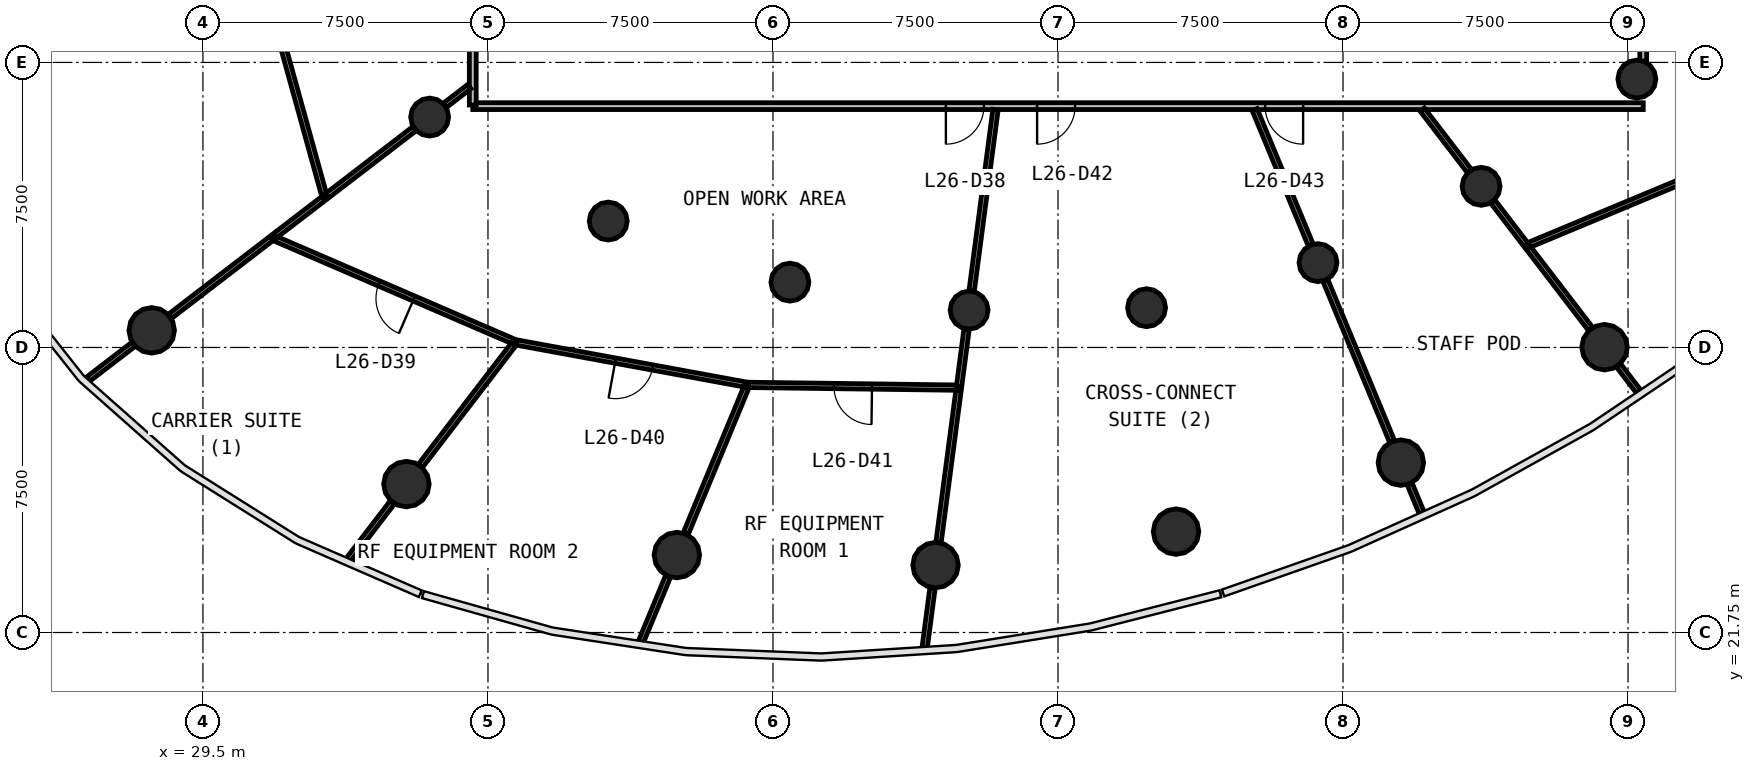
"""IFC4 building model, lengths in metres.
Left out: names, types, materials, properties, quantities, classifications, styles, units other than length and angle.
Written with IfcOpenShell. Run it as: python <this file> out.ifc"""

import sys

from ifc_helpers import new_model, si_unit, direction, frame, frame_2d, origin, origin_2d, place, context, subcontext, project, spatial, rectangle, circle, extrude, source, transform, mapped, element, fill, save


model = new_model("IFC4")
c1 = context("Model", 3, precision=1e-05, world=origin(), true_north=direction((0.0, 1.0)))
c2 = subcontext(c1, "Body", "Model", "MODEL_VIEW")
j1 = project(units=[si_unit("LENGTHUNIT", "METRE"), si_unit("PLANEANGLEUNIT", "RADIAN")], contexts=[c1])
p1 = place(None, origin())
s1 = spatial("IfcSite", under=j1, at=p1, CompositionType="ELEMENT")
p2 = place(p1, origin())
s2 = spatial("IfcBuilding", under=s1, at=p2, CompositionType="ELEMENT")
p3 = place(p2, frame((0.0, 0.0, 112.6)))
s3 = spatial("IfcBuildingStorey", under=s2, at=p3, CompositionType="ELEMENT", Elevation=112.6)
m1 = source(origin(), c2, "Body", "SweptSolid", [
    extrude(circle(Radius=0.6, at=origin_2d()), origin(), (0.0, 0.0, 1.0), 4.1),
])
for number, where, z_axis, x_axis in (
    (1, (28.152, 29.701, 0.0), (0.0, 0.0, 1.0), (1.0, 0.0, 0.0)),
    (2, (34.854, 25.655, 0.0), (0.0, 0.0, 1.0), (1.0, 0.0, 0.0)),
    (3, (41.971, 23.788, 0.0), (0.0, 0.0, 1.0), (1.0, 0.0, 0.0)),
    (4, (48.778, 23.523, 0.0), (0.0, 0.0, 1.0), (1.0, 0.0, 0.0)),
    (5, (55.106, 24.405, 0.0), (0.0, 0.0, 1.0), (1.0, 0.0, 0.0)),
    (6, (61.022, 26.219, 0.0), (0.0, 0.0, 1.0), (1.0, 0.0, 0.0)),
    (7, (66.382, 29.257, 0.0), (0.0, 0.0, 1.0), (1.0, 0.0, 0.0)),
):
    element("IfcColumn", number, at=place(p3, frame(where, z_axis=z_axis, x_axis=x_axis)), inside=s3, PredefinedType="COLUMN", context=c2, shape_type="MappedRepresentation", body=[
        mapped(m1, transform((0.0, 0.0, 0.0), scale=1.0)),
    ])
m2 = source(origin(), c2, "Body", "SweptSolid", [
    extrude(circle(Radius=0.5, at=origin_2d()), origin(), (0.0, 0.0, 1.0), 4.1),
])
for number, where, z_axis, x_axis in (
    (8, (35.465, 35.312, 0.0), (0.0, 0.0, 1.0), (1.0, 0.0, 0.0)),
    (9, (40.165, 32.576, 0.0), (0.0, 0.0, 1.0), (1.0, 0.0, 0.0)),
    (10, (44.945, 30.969, 0.0), (0.0, 0.0, 1.0), (1.0, 0.0, 0.0)),
    (11, (49.661, 30.233, 0.0), (0.0, 0.0, 1.0), (1.0, 0.0, 0.0)),
    (12, (54.331, 30.297, 0.0), (0.0, 0.0, 1.0), (1.0, 0.0, 0.0)),
    (13, (58.842, 31.482, 0.0), (0.0, 0.0, 1.0), (1.0, 0.0, 0.0)),
    (14, (63.134, 33.49, 0.0), (0.0, 0.0, 1.0), (1.0, 0.0, 0.0)),
    (15, (67.232, 36.312, 0.0), (0.0, 0.0, 1.0), (1.0, 0.0, 0.0)),
):
    element("IfcColumn", number, at=place(p3, frame(where, z_axis=z_axis, x_axis=x_axis)), inside=s3, PredefinedType="COLUMN", context=c2, shape_type="MappedRepresentation", body=[
        mapped(m2, transform((0.0, 0.0, 0.0), scale=1.0)),
    ])
p4 = place(p3, frame((67.4, 35.6, 0.0), z_axis=(0.0, 0.0, 1.0), x_axis=(-1.0, 0.0, 0.0)))
e16 = element("IfcWall", 16, at=p4, inside=s3, PredefinedType="PARTITIONING", context=c2, shape_type="SweptSolid", body=[
    extrude(rectangle(XDim=30.8, YDim=0.18, at=frame_2d((15.4, 0.0))), origin(), (0.0, 0.0, 1.0), 2.9),
])
p5 = place(p4, frame((17.35, 0.0, 0.0)))
e17 = element("IfcOpeningElement", 17, at=p5, cuts=e16, PredefinedType="OPENING", context=c2, shape_type="SweptSolid", body=[
    extrude(rectangle(XDim=1.0, YDim=2.1, at=frame_2d((0.5, 1.05))), frame((0.0, 0.1, 0.0), z_axis=(0.0, -1.0, 0.0), x_axis=(1.0, 0.0, 0.0)), (0.0, 0.0, 1.0), 0.2),
])
p6 = place(p4, frame((14.95, 0.0, 0.0)))
e18 = element("IfcOpeningElement", 18, at=p6, cuts=e16, PredefinedType="OPENING", context=c2, shape_type="SweptSolid", body=[
    extrude(rectangle(XDim=1.0, YDim=2.1, at=frame_2d((0.5, 1.05))), frame((0.0, 0.1, 0.0), z_axis=(0.0, -1.0, 0.0), x_axis=(1.0, 0.0, 0.0)), (0.0, 0.0, 1.0), 0.2),
])
p7 = place(p4, frame((8.95, 0.0, 0.0)))
e19 = element("IfcOpeningElement", 19, at=p7, cuts=e16, PredefinedType="OPENING", context=c2, shape_type="SweptSolid", body=[
    extrude(rectangle(XDim=1.0, YDim=2.1, at=frame_2d((0.5, 1.05))), frame((0.0, 0.1, 0.0), z_axis=(0.0, -1.0, 0.0), x_axis=(1.0, 0.0, 0.0)), (0.0, 0.0, 1.0), 0.2),
])
p8 = place(p3, frame((67.4, 60.37, 0.0), z_axis=(0.0, 0.0, 1.0), x_axis=(0.0, -1.0, 0.0)))
e20 = element("IfcWall", 20, at=p8, inside=s3, PredefinedType="PARTITIONING", context=c2, shape_type="SweptSolid", body=[
    extrude(rectangle(XDim=23.583, YDim=0.18, at=frame_2d((11.791, 0.0))), origin(), (0.0, 0.0, 1.0), 2.9),
])
p9 = place(p8, frame((9.232, 0.0, 0.0)))
e21 = element("IfcOpeningElement", 21, at=p9, cuts=e20, PredefinedType="OPENING", context=c2, shape_type="SweptSolid", body=[
    extrude(rectangle(XDim=0.9, YDim=2.1, at=frame_2d((0.45, 1.05))), frame((0.0, 0.1, 0.0), z_axis=(0.0, -1.0, 0.0), x_axis=(1.0, 0.0, 0.0)), (0.0, 0.0, 1.0), 0.2),
])
p10 = place(p8, frame((6.232, 0.0, 0.0)))
e22 = element("IfcOpeningElement", 22, at=p10, cuts=e20, PredefinedType="OPENING", context=c2, shape_type="SweptSolid", body=[
    extrude(rectangle(XDim=0.9, YDim=2.1, at=frame_2d((0.45, 1.05))), frame((0.0, 0.1, 0.0), z_axis=(0.0, -1.0, 0.0), x_axis=(1.0, 0.0, 0.0)), (0.0, 0.0, 1.0), 0.2),
])
p11 = place(p8, frame((3.032, 0.0, 0.0)))
e23 = element("IfcOpeningElement", 23, at=p11, cuts=e20, PredefinedType="OPENING", context=c2, shape_type="SweptSolid", body=[
    extrude(rectangle(XDim=0.9, YDim=2.1, at=frame_2d((0.45, 1.05))), frame((0.0, 0.1, 0.0), z_axis=(0.0, -1.0, 0.0), x_axis=(1.0, 0.0, 0.0)), (0.0, 0.0, 1.0), 0.2),
])
p12 = place(p8, frame((11.333, 0.0, 0.0)))
e24 = element("IfcOpeningElement", 24, at=p12, cuts=e20, PredefinedType="OPENING", context=c2, shape_type="SweptSolid", body=[
    extrude(rectangle(XDim=1.0, YDim=2.1, at=frame_2d((0.5, 1.05))), frame((0.0, 0.1, 0.0), z_axis=(0.0, -1.0, 0.0), x_axis=(1.0, 0.0, 0.0)), (0.0, 0.0, 1.0), 0.2),
])
p13 = place(p3, frame((36.6, 35.63, 0.0), z_axis=(0.0, 0.0, 1.0), x_axis=(0.0, 1.0, 0.0)))
e25 = element("IfcWall", 25, at=p13, inside=s3, PredefinedType="PARTITIONING", context=c2, shape_type="SweptSolid", body=[
    extrude(rectangle(XDim=23.583, YDim=0.18, at=frame_2d((11.791, 0.0))), origin(), (0.0, 0.0, 1.0), 2.9),
])
p14 = place(p13, frame((19.133, 0.0, 0.0)))
e26 = element("IfcOpeningElement", 26, at=p14, cuts=e25, PredefinedType="OPENING", context=c2, shape_type="SweptSolid", body=[
    extrude(rectangle(XDim=1.0, YDim=2.1, at=frame_2d((0.5, 1.05))), frame((0.0, 0.1, 0.0), z_axis=(0.0, -1.0, 0.0), x_axis=(1.0, 0.0, 0.0)), (0.0, 0.0, 1.0), 0.2),
])
p15 = place(p13, frame((11.333, 0.0, 0.0)))
e27 = element("IfcOpeningElement", 27, at=p15, cuts=e25, PredefinedType="OPENING", context=c2, shape_type="SweptSolid", body=[
    extrude(rectangle(XDim=1.0, YDim=2.1, at=frame_2d((0.5, 1.05))), frame((0.0, 0.1, 0.0), z_axis=(0.0, -1.0, 0.0), x_axis=(1.0, 0.0, 0.0)), (0.0, 0.0, 1.0), 0.2),
])
p16 = place(p3, frame((37.718, 29.387, 0.0), z_axis=(0.0, 0.0, 1.0), x_axis=(-0.918146849398, 0.396240284349, 0.0)))
e28 = element("IfcWall", 28, at=p16, inside=s3, PredefinedType="PARTITIONING", context=c2, shape_type="SweptSolid", body=[
    extrude(rectangle(XDim=6.953, YDim=0.14, at=frame_2d((3.477, 0.0))), origin(), (0.0, 0.0, 1.0), 2.9),
])
p17 = place(p16, frame((2.903, 0.0, 0.0)))
e29 = element("IfcOpeningElement", 29, at=p17, cuts=e28, PredefinedType="OPENING", context=c2, shape_type="SweptSolid", body=[
    extrude(rectangle(XDim=1.0, YDim=2.1, at=frame_2d((0.5, 1.05))), frame((0.0, 0.08, 0.0), z_axis=(0.0, -1.0, 0.0), x_axis=(1.0, 0.0, 0.0)), (0.0, 0.0, 1.0), 0.16),
])
p18 = place(p3, frame((43.826, 28.265, 0.0), z_axis=(0.0, 0.0, 1.0), x_axis=(-0.983538283384, 0.180699875811, 0.0)))
e30 = element("IfcWall", 30, at=p18, inside=s3, PredefinedType="PARTITIONING", context=c2, shape_type="SweptSolid", body=[
    extrude(rectangle(XDim=6.18, YDim=0.14, at=frame_2d((3.09, 0.0))), origin(), (0.0, 0.0, 1.0), 2.9),
])
p19 = place(p18, frame((2.53, 0.0, 0.0)))
e31 = element("IfcOpeningElement", 31, at=p19, cuts=e30, PredefinedType="OPENING", context=c2, shape_type="SweptSolid", body=[
    extrude(rectangle(XDim=1.0, YDim=2.1, at=frame_2d((0.5, 1.05))), frame((0.0, 0.08, 0.0), z_axis=(0.0, -1.0, 0.0), x_axis=(1.0, 0.0, 0.0)), (0.0, 0.0, 1.0), 0.16),
])
p20 = place(p3, frame((64.336, 31.924, 0.0), z_axis=(0.0, 0.0, 1.0), x_axis=(0.922965808989, 0.384881950002, 0.0)))
e32 = element("IfcWall", 32, at=p20, inside=s3, PredefinedType="PARTITIONING", context=c2, shape_type="SweptSolid", body=[
    extrude(rectangle(XDim=6.048, YDim=0.14, at=frame_2d((3.024, 0.0))), origin(), (0.0, 0.0, 1.0), 2.9),
])
p21 = place(p3, frame((31.095, 39.022, 0.0), z_axis=(0.0, 0.0, 1.0), x_axis=(0.266539759446, -0.963823924083, 0.0)))
e33 = element("IfcWall", 33, at=p21, inside=s3, PredefinedType="PARTITIONING", context=c2, shape_type="SweptSolid", body=[
    extrude(rectangle(XDim=6.045, YDim=0.14, at=frame_2d((3.023, 0.0))), origin(), (0.0, 0.0, 1.0), 2.9),
])
p22 = place(p3, frame((49.392, 28.193, 0.0), z_axis=(0.0, 0.0, 1.0), x_axis=(-0.999914253275, 0.013095270007, 0.0)))
e34 = element("IfcWall", 34, at=p22, inside=s3, PredefinedType="PARTITIONING", context=c2, shape_type="SweptSolid", body=[
    extrude(rectangle(XDim=5.537, YDim=0.14, at=frame_2d((2.769, 0.0))), origin(), (0.0, 0.0, 1.0), 2.9),
])
p23 = place(p22, frame((2.287, 0.0, 0.0)))
e35 = element("IfcOpeningElement", 35, at=p23, cuts=e34, PredefinedType="OPENING", context=c2, shape_type="SweptSolid", body=[
    extrude(rectangle(XDim=1.0, YDim=2.1, at=frame_2d((0.5, 1.05))), frame((0.0, 0.08, 0.0), z_axis=(0.0, -1.0, 0.0), x_axis=(1.0, 0.0, 0.0)), (0.0, 0.0, 1.0), 0.16),
])
p24 = place(p3, frame((50.356, 35.51, 0.0), z_axis=(0.0, 0.0, 1.0), x_axis=(-0.130523979823, -0.991445152639, 0.0)))
e36 = element("IfcWall", 36, at=p24, inside=s3, PredefinedType="PARTITIONING", context=c2, shape_type="SweptSolid", body=[
    extrude(rectangle(XDim=4.818, YDim=0.14, at=frame_2d((2.409, 0.0))), origin(), (0.0, 0.0, 1.0), 2.9),
])
p25 = place(p3, frame((59.035, 31.016, 0.0), z_axis=(0.0, 0.0, 1.0), x_axis=(0.382705930348, -0.923870213221, 0.0)))
e37 = element("IfcWall", 37, at=p25, inside=s3, PredefinedType="PARTITIONING", context=c2, shape_type="SweptSolid", body=[
    extrude(rectangle(XDim=4.587, YDim=0.14, at=frame_2d((2.293, 0.0))), origin(), (0.0, 0.0, 1.0), 2.9),
])
p26 = place(p3, frame((43.798, 28.199, 0.0), z_axis=(0.0, 0.0, 1.0), x_axis=(-0.382718911932, -0.923864835595, 0.0)))
e38 = element("IfcWall", 38, at=p26, inside=s3, PredefinedType="PARTITIONING", context=c2, shape_type="SweptSolid", body=[
    extrude(rectangle(XDim=4.17, YDim=0.14, at=frame_2d((2.085, 0.0))), origin(), (0.0, 0.0, 1.0), 2.9),
])
p27 = place(p3, frame((49.383, 28.123, 0.0), z_axis=(0.0, 0.0, 1.0), x_axis=(-0.130510858064, -0.991446880033, 0.0)))
e39 = element("IfcWall", 39, at=p27, inside=s3, PredefinedType="PARTITIONING", context=c2, shape_type="SweptSolid", body=[
    extrude(rectangle(XDim=4.035, YDim=0.14, at=frame_2d((2.018, 0.0))), origin(), (0.0, 0.0, 1.0), 2.9),
])
p28 = place(p3, frame((37.674, 29.33, 0.0), z_axis=(0.0, 0.0, 1.0), x_axis=(-0.608749592837, -0.793362422365, 0.0)))
e40 = element("IfcWall", 40, at=p28, inside=s3, PredefinedType="PARTITIONING", context=c2, shape_type="SweptSolid", body=[
    extrude(rectangle(XDim=4.028, YDim=0.14, at=frame_2d((2.014, 0.0))), origin(), (0.0, 0.0, 1.0), 2.9),
])
p29 = place(p3, frame((57.174, 35.51, 0.0), z_axis=(0.0, 0.0, 1.0), x_axis=(0.382644558062, -0.923895633817, 0.0)))
e41 = element("IfcWall", 41, at=p29, inside=s3, PredefinedType="PARTITIONING", context=c2, shape_type="SweptSolid", body=[
    extrude(rectangle(XDim=3.854, YDim=0.14, at=frame_2d((1.927, 0.0))), origin(), (0.0, 0.0, 1.0), 2.9),
])
p30 = place(p3, frame((31.311, 32.125, 0.0), z_axis=(0.0, 0.0, 1.0), x_axis=(-0.793367783223, -0.608742606152, 0.0)))
e42 = element("IfcWall", 42, at=p30, inside=s3, PredefinedType="PARTITIONING", context=c2, shape_type="SweptSolid", body=[
    extrude(rectangle(XDim=3.377, YDim=0.14, at=frame_2d((1.688, 0.0))), origin(), (0.0, 0.0, 1.0), 2.9),
])
p31 = place(p3, frame((35.065, 35.005, 0.0), z_axis=(0.0, 0.0, 1.0), x_axis=(-0.793337721891, -0.608781782764, 0.0)))
e43 = element("IfcWall", 43, at=p31, inside=s3, PredefinedType="PARTITIONING", context=c2, shape_type="SweptSolid", body=[
    extrude(rectangle(XDim=2.897, YDim=0.14, at=frame_2d((1.448, 0.0))), origin(), (0.0, 0.0, 1.0), 2.9),
])
p32 = place(p3, frame((64.38, 31.866, 0.0), z_axis=(0.0, 0.0, 1.0), x_axis=(0.608796156599, -0.793326691666, 0.0)))
e44 = element("IfcWall", 44, at=p32, inside=s3, PredefinedType="PARTITIONING", context=c2, shape_type="SweptSolid", body=[
    extrude(rectangle(XDim=2.684, YDim=0.14, at=frame_2d((1.342, 0.0))), origin(), (0.0, 0.0, 1.0), 2.9),
])
p33 = place(p3, frame((61.584, 35.51, 0.0), z_axis=(0.0, 0.0, 1.0), x_axis=(0.608727763541, -0.793379171578, 0.0)))
e45 = element("IfcWall", 45, at=p33, inside=s3, PredefinedType="PARTITIONING", context=c2, shape_type="SweptSolid", body=[
    extrude(rectangle(XDim=2.042, YDim=0.14, at=frame_2d((1.021, 0.0))), origin(), (0.0, 0.0, 1.0), 2.9),
])
p34 = place(p3, frame((34.486, 25.176, 0.0), z_axis=(0.0, 0.0, 1.0), x_axis=(-0.608775965964, -0.793342185482, 0.0)))
e46 = element("IfcWall", 46, at=p34, inside=s3, PredefinedType="PARTITIONING", context=c2, shape_type="SweptSolid", body=[
    extrude(rectangle(XDim=1.919, YDim=0.14, at=frame_2d((0.96, 0.0))), origin(), (0.0, 0.0, 1.0), 2.9),
])
p35 = place(p3, frame((41.74, 23.229, 0.0), z_axis=(0.0, 0.0, 1.0), x_axis=(-0.3827117772, -0.923867791187, 0.0)))
e47 = element("IfcWall", 47, at=p35, inside=s3, PredefinedType="PARTITIONING", context=c2, shape_type="SweptSolid", body=[
    extrude(rectangle(XDim=1.877, YDim=0.14, at=frame_2d((0.938, 0.0))), origin(), (0.0, 0.0, 1.0), 2.9),
])
p36 = place(p3, frame((32.683, 33.177, 0.0), z_axis=(0.0, 0.0, 1.0), x_axis=(-0.793368572463, -0.608741577542, 0.0)))
e48 = element("IfcWall", 48, at=p36, inside=s3, PredefinedType="PARTITIONING", context=c2, shape_type="SweptSolid", body=[
    extrude(rectangle(XDim=1.62, YDim=0.14, at=frame_2d((0.81, 0.0))), origin(), (0.0, 0.0, 1.0), 2.9),
])
p37 = place(p3, frame((48.699, 22.924, 0.0), z_axis=(0.0, 0.0, 1.0), x_axis=(-0.130526351537, -0.991444840399, 0.0)))
e49 = element("IfcWall", 49, at=p37, inside=s3, PredefinedType="PARTITIONING", context=c2, shape_type="SweptSolid", body=[
    extrude(rectangle(XDim=1.582, YDim=0.14, at=frame_2d((0.791, 0.0))), origin(), (0.0, 0.0, 1.0), 2.9),
])
p38 = place(p3, frame((49.595, 29.733, 0.0), z_axis=(0.0, 0.0, 1.0), x_axis=(-0.130462804468, -0.991453204468, 0.0)))
e50 = element("IfcWall", 50, at=p38, inside=s3, PredefinedType="PARTITIONING", context=c2, shape_type="SweptSolid", body=[
    extrude(rectangle(XDim=1.523, YDim=0.14, at=frame_2d((0.762, 0.0))), origin(), (0.0, 0.0, 1.0), 2.9),
])
p39 = place(p3, frame((27.672, 29.333, 0.0), z_axis=(0.0, 0.0, 1.0), x_axis=(-0.793320214774, -0.608804596592, 0.0)))
e51 = element("IfcWall", 51, at=p39, inside=s3, PredefinedType="PARTITIONING", context=c2, shape_type="SweptSolid", body=[
    extrude(rectangle(XDim=1.511, YDim=0.14, at=frame_2d((0.755, 0.0))), origin(), (0.0, 0.0, 1.0), 2.9),
])
p40 = place(p3, frame((63.441, 33.09, 0.0), z_axis=(0.0, 0.0, 1.0), x_axis=(0.608726959118, -0.793379788779, 0.0)))
e52 = element("IfcWall", 52, at=p40, inside=s3, PredefinedType="PARTITIONING", context=c2, shape_type="SweptSolid", body=[
    extrude(rectangle(XDim=1.44, YDim=0.14, at=frame_2d((0.72, 0.0))), origin(), (0.0, 0.0, 1.0), 2.9),
])
p41 = place(p3, frame((36.51, 36.114, 0.0), z_axis=(0.0, 0.0, 1.0), x_axis=(-0.793316076519, -0.608809989025, 0.0)))
e53 = element("IfcWall", 53, at=p41, inside=s3, PredefinedType="PARTITIONING", context=c2, shape_type="SweptSolid", body=[
    extrude(rectangle(XDim=0.812, YDim=0.14, at=frame_2d((0.406, 0.0))), origin(), (0.0, 0.0, 1.0), 2.9),
])
p42 = place(p3, frame((66.75, 28.778, 0.0), z_axis=(0.0, 0.0, 1.0), x_axis=(0.608583077593, -0.7934901623, 0.0)))
e54 = element("IfcWall", 54, at=p42, inside=s3, PredefinedType="PARTITIONING", context=c2, shape_type="SweptSolid", body=[
    extrude(rectangle(XDim=0.879, YDim=0.14, at=frame_2d((0.44, 0.0))), origin(), (0.0, 0.0, 1.0), 2.9),
])
p43 = place(p3, frame((61.253, 25.66, 0.0), z_axis=(0.0, 0.0, 1.0), x_axis=(0.382585904135, -0.923919923996, 0.0)))
e55 = element("IfcWall", 55, at=p43, inside=s3, PredefinedType="PARTITIONING", context=c2, shape_type="SweptSolid", body=[
    extrude(rectangle(XDim=0.829, YDim=0.14, at=frame_2d((0.415, 0.0))), origin(), (0.0, 0.0, 1.0), 2.9),
])
m3 = source(origin(), c2, "Body", "SweptSolid", [
    extrude(rectangle(XDim=1.0, YDim=2.1, at=frame_2d((0.5, 1.05))), frame((0.0, 0.025, 0.0), z_axis=(0.0, -1.0, 0.0), x_axis=(1.0, 0.0, 0.0)), (0.0, 0.0, 1.0), 0.05),
])
p44 = place(p5, origin())
e56 = element("IfcDoor", 56, at=p44, inside=s3, OperationType="SINGLE_SWING_RIGHT", PredefinedType="DOOR", context=c2, shape_type="MappedRepresentation", body=[
    mapped(m3, transform((0.0, 0.0, 0.0), scale=1.0)),
])
fill(e17, e56)
p45 = place(p17, origin())
e57 = element("IfcDoor", 57, at=p45, inside=s3, OperationType="SINGLE_SWING_LEFT", PredefinedType="DOOR", context=c2, shape_type="MappedRepresentation", body=[
    mapped(m3, transform((0.0, 0.0, 0.0), scale=1.0)),
])
fill(e29, e57)
p46 = place(p19, origin())
e58 = element("IfcDoor", 58, at=p46, inside=s3, OperationType="SINGLE_SWING_RIGHT", PredefinedType="DOOR", context=c2, shape_type="MappedRepresentation", body=[
    mapped(m3, transform((0.0, 0.0, 0.0), scale=1.0)),
])
fill(e31, e58)
p47 = place(p23, origin())
e59 = element("IfcDoor", 59, at=p47, inside=s3, OperationType="SINGLE_SWING_LEFT", PredefinedType="DOOR", context=c2, shape_type="MappedRepresentation", body=[
    mapped(m3, transform((0.0, 0.0, 0.0), scale=1.0)),
])
fill(e35, e59)
p48 = place(p6, origin())
e60 = element("IfcDoor", 60, at=p48, inside=s3, OperationType="SINGLE_SWING_RIGHT", PredefinedType="DOOR", context=c2, shape_type="MappedRepresentation", body=[
    mapped(m3, transform((0.0, 0.0, 0.0), scale=1.0)),
])
fill(e18, e60)
p49 = place(p7, origin())
e61 = element("IfcDoor", 61, at=p49, inside=s3, OperationType="SINGLE_SWING_LEFT", PredefinedType="DOOR", context=c2, shape_type="MappedRepresentation", body=[
    mapped(m3, transform((0.0, 0.0, 0.0), scale=1.0)),
])
fill(e19, e61)
save(model, sys.argv[1])
